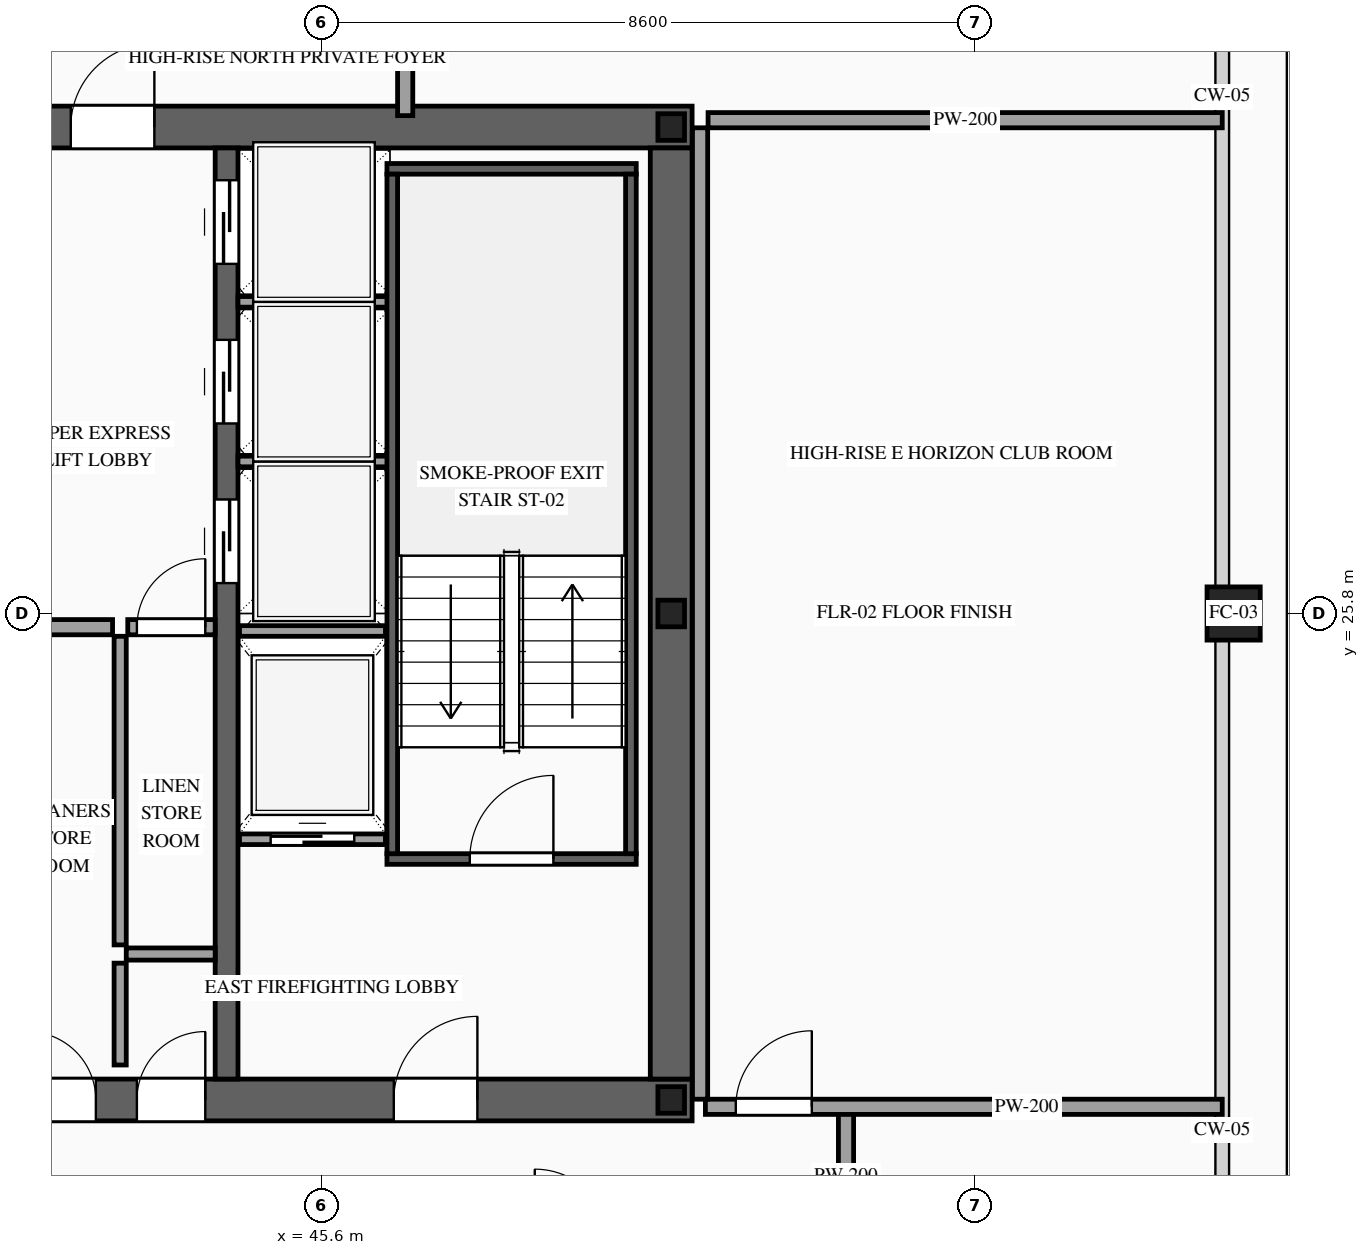
"""IFC4 building model, lengths in metres.
Left out: names, types, materials, properties, quantities, classifications, styles, units other than length and angle.
Written with IfcOpenShell. Run it as: python <this file> out.ifc"""

import sys

from ifc_helpers import new_model, si_unit, direction, frame, frame_2d, origin, origin_2d, place, context, subcontext, project, spatial, rectangle, hollow_rectangle, i_section, extrude, source, transform, mapped, element, fill, save


model = new_model("IFC4")
c1 = context("Model", 3, precision=1e-05, world=origin(), true_north=direction((0.0, 1.0)))
c2 = subcontext(c1, "Body", "Model", "MODEL_VIEW")
j1 = project(units=[si_unit("LENGTHUNIT", "METRE"), si_unit("PLANEANGLEUNIT", "RADIAN")], contexts=[c1])
p1 = place(None, origin())
s1 = spatial("IfcSite", under=j1, at=p1, CompositionType="ELEMENT")
p2 = place(p1, origin())
s2 = spatial("IfcBuilding", under=s1, at=p2, CompositionType="ELEMENT")
p3 = place(p2, frame((0.0, 0.0, 268.1)))
s3 = spatial("IfcBuildingStorey", under=s2, at=p3, CompositionType="ELEMENT", Elevation=268.1)
p4 = place(p3, frame((23.525, 19.4, 0.0), z_axis=(0.0, 0.0, 1.0), x_axis=(1.0, 0.0, 0.0)))
e1 = element("IfcWall", 1, at=p4, inside=s3, PredefinedType="SHEAR", context=c2, shape_type="SweptSolid", body=[
    extrude(rectangle(XDim=26.95, YDim=0.55, at=frame_2d((13.475, 0.0))), origin(), (0.0, 0.0, 1.0), 3.5),
])
p5 = place(p4, frame((1.925, 0.0, 0.0)))
e2 = element("IfcOpeningElement", 2, at=p5, cuts=e1, PredefinedType="OPENING", context=c2, shape_type="SweptSolid", body=[
    extrude(rectangle(XDim=1.1, YDim=2.2, at=frame_2d((0.55, 1.1))), frame((0.0, 0.29, 0.0), z_axis=(0.0, -1.0, 0.0), x_axis=(1.0, 0.0, 0.0)), (0.0, 0.0, 1.0), 0.58),
])
p6 = place(p4, frame((9.825, 0.0, 0.0)))
e3 = element("IfcOpeningElement", 3, at=p6, cuts=e1, PredefinedType="OPENING", context=c2, shape_type="SweptSolid", body=[
    extrude(rectangle(XDim=1.1, YDim=2.2, at=frame_2d((0.55, 1.1))), frame((0.0, 0.29, 0.0), z_axis=(0.0, -1.0, 0.0), x_axis=(1.0, 0.0, 0.0)), (0.0, 0.0, 1.0), 0.58),
])
p7 = place(p4, frame((23.025, 0.0, 0.0)))
e4 = element("IfcOpeningElement", 4, at=p7, cuts=e1, PredefinedType="OPENING", context=c2, shape_type="SweptSolid", body=[
    extrude(rectangle(XDim=1.1, YDim=2.2, at=frame_2d((0.55, 1.1))), frame((0.0, 0.29, 0.0), z_axis=(0.0, -1.0, 0.0), x_axis=(1.0, 0.0, 0.0)), (0.0, 0.0, 1.0), 0.58),
])
p8 = place(p4, frame((19.645, 0.0, 0.0)))
e5 = element("IfcOpeningElement", 5, at=p8, cuts=e1, PredefinedType="OPENING", context=c2, shape_type="SweptSolid", body=[
    extrude(rectangle(XDim=0.9, YDim=2.15, at=frame_2d((0.45, 1.075))), frame((0.0, 0.29, 0.0), z_axis=(0.0, -1.0, 0.0), x_axis=(1.0, 0.0, 0.0)), (0.0, 0.0, 1.0), 0.58),
])
p9 = place(p4, frame((18.205, 0.0, 0.0)))
e6 = element("IfcOpeningElement", 6, at=p9, cuts=e1, PredefinedType="OPENING", context=c2, shape_type="SweptSolid", body=[
    extrude(rectangle(XDim=0.9, YDim=2.15, at=frame_2d((0.45, 1.075))), frame((0.0, 0.29, 0.0), z_axis=(0.0, -1.0, 0.0), x_axis=(1.0, 0.0, 0.0)), (0.0, 0.0, 1.0), 0.58),
])
p10 = place(p3, frame((23.525, 32.2, 0.0), z_axis=(0.0, 0.0, 1.0), x_axis=(1.0, 0.0, 0.0)))
e7 = element("IfcWall", 7, at=p10, inside=s3, PredefinedType="SHEAR", context=c2, shape_type="SweptSolid", body=[
    extrude(rectangle(XDim=26.95, YDim=0.55, at=frame_2d((13.475, 0.0))), origin(), (0.0, 0.0, 1.0), 3.5),
])
p11 = place(p10, frame((4.545, 0.0, 0.0)))
e8 = element("IfcOpeningElement", 8, at=p11, cuts=e7, PredefinedType="OPENING", context=c2, shape_type="SweptSolid", body=[
    extrude(rectangle(XDim=0.9, YDim=2.15, at=frame_2d((0.45, 1.075))), frame((0.0, 0.29, 0.0), z_axis=(0.0, -1.0, 0.0), x_axis=(1.0, 0.0, 0.0)), (0.0, 0.0, 1.0), 0.58),
])
p12 = place(p10, frame((9.825, 0.0, 0.0)))
e9 = element("IfcOpeningElement", 9, at=p12, cuts=e7, PredefinedType="OPENING", context=c2, shape_type="SweptSolid", body=[
    extrude(rectangle(XDim=1.1, YDim=2.2, at=frame_2d((0.55, 1.1))), frame((0.0, 0.29, 0.0), z_axis=(0.0, -1.0, 0.0), x_axis=(1.0, 0.0, 0.0)), (0.0, 0.0, 1.0), 0.58),
])
p13 = place(p10, frame((15.675, 0.0, 0.0)))
e10 = element("IfcOpeningElement", 10, at=p13, cuts=e7, PredefinedType="OPENING", context=c2, shape_type="SweptSolid", body=[
    extrude(rectangle(XDim=1.1, YDim=2.2, at=frame_2d((0.55, 1.1))), frame((0.0, 0.29, 0.0), z_axis=(0.0, -1.0, 0.0), x_axis=(1.0, 0.0, 0.0)), (0.0, 0.0, 1.0), 0.58),
])
p14 = place(p10, frame((18.775, 0.0, 0.0)))
e11 = element("IfcOpeningElement", 11, at=p14, cuts=e7, PredefinedType="OPENING", context=c2, shape_type="SweptSolid", body=[
    extrude(rectangle(XDim=1.1, YDim=2.2, at=frame_2d((0.55, 1.1))), frame((0.0, 0.29, 0.0), z_axis=(0.0, -1.0, 0.0), x_axis=(1.0, 0.0, 0.0)), (0.0, 0.0, 1.0), 0.58),
])
m1 = source(origin(), c2, "Body", "SweptSolid", [
    extrude(rectangle(XDim=12.25, YDim=0.55, at=frame_2d((6.125, 0.0))), origin(), (0.0, 0.0, 1.0), 3.5),
])
p15 = place(p3, frame((50.2, 19.675, 0.0), z_axis=(0.0, 0.0, 1.0), x_axis=(0.0, 1.0, 0.0)))
e12 = element("IfcWall", 12, at=p15, inside=s3, PredefinedType="SHEAR", context=c2, shape_type="MappedRepresentation", body=[
    mapped(m1, transform((0.0, 0.0, 0.0), scale=1.0)),
])
p16 = place(p3, frame((44.35, 19.675, 0.0), z_axis=(0.0, 0.0, 1.0), x_axis=(0.0, 1.0, 0.0)))
e13 = element("IfcWall", 13, at=p16, inside=s3, PredefinedType="SOLIDWALL", context=c2, shape_type="SweptSolid", body=[
    extrude(rectangle(XDim=12.25, YDim=0.3, at=frame_2d((6.125, 0.0))), origin(), (0.0, 0.0, 1.0), 3.5),
])
p17 = place(p16, frame((6.525, 0.0, 0.0)))
e14 = element("IfcOpeningElement", 14, at=p17, cuts=e13, PredefinedType="OPENING", context=c2, shape_type="SweptSolid", body=[
    extrude(rectangle(XDim=1.1, YDim=2.2, at=frame_2d((0.55, 1.1))), frame((0.0, 0.165, 0.0), z_axis=(0.0, -1.0, 0.0), x_axis=(1.0, 0.0, 0.0)), (0.0, 0.0, 1.0), 0.33),
])
p18 = place(p16, frame((8.625, 0.0, 0.0)))
e15 = element("IfcOpeningElement", 15, at=p18, cuts=e13, PredefinedType="OPENING", context=c2, shape_type="SweptSolid", body=[
    extrude(rectangle(XDim=1.1, YDim=2.2, at=frame_2d((0.55, 1.1))), frame((0.0, 0.165, 0.0), z_axis=(0.0, -1.0, 0.0), x_axis=(1.0, 0.0, 0.0)), (0.0, 0.0, 1.0), 0.33),
])
p19 = place(p16, frame((10.725, 0.0, 0.0)))
e16 = element("IfcOpeningElement", 16, at=p19, cuts=e13, PredefinedType="OPENING", context=c2, shape_type="SweptSolid", body=[
    extrude(rectangle(XDim=1.1, YDim=2.2, at=frame_2d((0.55, 1.1))), frame((0.0, 0.165, 0.0), z_axis=(0.0, -1.0, 0.0), x_axis=(1.0, 0.0, 0.0)), (0.0, 0.0, 1.0), 0.33),
])
m2 = source(origin(), c2, "Body", "SweptSolid", [
    extrude(i_section(OverallWidth=0.35, OverallDepth=0.35, WebThickness=0.012, FlangeThickness=0.019, at=origin_2d()), origin(), (0.0, 0.0, 1.0), 3.5),
])
for number, where, z_axis, x_axis in (
    (17, (50.2, 19.4, 0.0), (0.0, 0.0, 1.0), (1.0, 0.0, 0.0)),
    (18, (50.2, 25.8, 0.0), (0.0, 0.0, 1.0), (1.0, 0.0, 0.0)),
    (19, (50.2, 32.2, 0.0), (0.0, 0.0, 1.0), (1.0, 0.0, 0.0)),
):
    element("IfcColumn", number, at=place(p3, frame(where, z_axis=z_axis, x_axis=x_axis)), inside=s3, PredefinedType="COLUMN", context=c2, shape_type="MappedRepresentation", body=[
        mapped(m2, transform((0.0, 0.0, 0.0), scale=1.0)),
    ])
m3 = source(origin(), c2, "Body", "SweptSolid", [
    extrude(hollow_rectangle(XDim=0.7, YDim=0.7, WallThickness=0.032, at=origin_2d()), origin(), (0.0, 0.0, 1.0), 3.5),
])
p20 = place(p3, frame((57.6, 25.8, 0.0), z_axis=(0.0, 0.0, 1.0), x_axis=(1.0, 0.0, 0.0)))
e20 = element("IfcColumn", 20, at=p20, inside=s3, PredefinedType="COLUMN", context=c2, shape_type="MappedRepresentation", body=[
    mapped(m3, transform((0.0, 0.0, 0.0), scale=1.0)),
])
p21 = place(p3, frame((44.52, 22.83, 0.0), z_axis=(0.0, 0.0, 1.0), x_axis=(1.0, 0.0, 0.0)))
e21 = element("IfcWall", 21, at=p21, inside=s3, PredefinedType="SOLIDWALL", context=c2, shape_type="SweptSolid", body=[
    extrude(rectangle(XDim=1.92, YDim=0.14, at=frame_2d((0.96, 0.0))), origin(), (0.0, 0.0, 1.0), 3.28),
])
p22 = place(p21, frame((0.41, 0.0, 0.0)))
e22 = element("IfcOpeningElement", 22, at=p22, cuts=e21, PredefinedType="OPENING", context=c2, shape_type="SweptSolid", body=[
    extrude(rectangle(XDim=1.1, YDim=2.2, at=frame_2d((0.55, 1.1))), frame((0.0, 0.085, 0.0), z_axis=(0.0, -1.0, 0.0), x_axis=(1.0, 0.0, 0.0)), (0.0, 0.0, 1.0), 0.17),
])
m4 = source(origin(), c2, "Body", "SweptSolid", [
    extrude(rectangle(XDim=1.92, YDim=0.14, at=frame_2d((0.96, 0.0))), origin(), (0.0, 0.0, 1.0), 3.28),
])
p23 = place(p3, frame((44.52, 25.57, 0.0), z_axis=(0.0, 0.0, 1.0), x_axis=(1.0, 0.0, 0.0)))
e23 = element("IfcWall", 23, at=p23, inside=s3, PredefinedType="SOLIDWALL", context=c2, shape_type="MappedRepresentation", body=[
    mapped(m4, transform((0.0, 0.0, 0.0), scale=1.0)),
])
m5 = source(origin(), c2, "Body", "SweptSolid", [
    extrude(rectangle(XDim=2.0, YDim=0.14, at=frame_2d((1.0, 0.0))), origin(), (0.0, 0.0, 1.0), 3.28),
])
for number, where, z_axis, x_axis in (
    (24, (44.5, 27.8, 0.0), (0.0, 0.0, 1.0), (1.0, 0.0, 0.0)),
    (25, (44.5, 29.9, 0.0), (0.0, 0.0, 1.0), (1.0, 0.0, 0.0)),
):
    element("IfcWall", number, at=place(p3, frame(where, z_axis=z_axis, x_axis=x_axis)), inside=s3, PredefinedType="SOLIDWALL", context=c2, shape_type="MappedRepresentation", body=[
        mapped(m5, transform((0.0, 0.0, 0.0), scale=1.0)),
    ])
p24 = place(p3, frame((46.46, 22.57, 0.0), z_axis=(0.0, 0.0, 1.0), x_axis=(1.0, 0.0, 0.0)))
e26 = element("IfcWall", 26, at=p24, inside=s3, PredefinedType="SOLIDWALL", context=c2, shape_type="SweptSolid", body=[
    extrude(rectangle(XDim=3.28, YDim=0.14, at=frame_2d((1.64, 0.0))), origin(), (0.0, 0.0, 1.0), 3.28),
])
p25 = place(p24, frame((1.09, 0.0, 0.0)))
e27 = element("IfcOpeningElement", 27, at=p25, cuts=e26, PredefinedType="OPENING", context=c2, shape_type="SweptSolid", body=[
    extrude(rectangle(XDim=1.1, YDim=2.2, at=frame_2d((0.55, 1.1))), frame((0.0, 0.085, 0.0), z_axis=(0.0, -1.0, 0.0), x_axis=(1.0, 0.0, 0.0)), (0.0, 0.0, 1.0), 0.17),
])
m6 = source(origin(), c2, "Body", "SweptSolid", [
    extrude(rectangle(XDim=3.28, YDim=0.14, at=frame_2d((1.64, 0.0))), origin(), (0.0, 0.0, 1.0), 3.28),
])
p26 = place(p3, frame((46.46, 31.65, 0.0), z_axis=(0.0, 0.0, 1.0), x_axis=(1.0, 0.0, 0.0)))
e28 = element("IfcWall", 28, at=p26, inside=s3, PredefinedType="SOLIDWALL", context=c2, shape_type="MappedRepresentation", body=[
    mapped(m6, transform((0.0, 0.0, 0.0), scale=1.0)),
])
m7 = source(origin(), c2, "Body", "SweptSolid", [
    extrude(rectangle(XDim=8.94, YDim=0.14, at=frame_2d((4.47, 0.0))), origin(), (0.0, 0.0, 1.0), 3.28),
])
for number, where, z_axis, x_axis in (
    (29, (46.53, 22.64, 0.0), (0.0, 0.0, 1.0), (0.0, 1.0, 0.0)),
    (30, (49.67, 22.64, 0.0), (0.0, 0.0, 1.0), (0.0, 1.0, 0.0)),
):
    element("IfcWall", number, at=place(p3, frame(where, z_axis=z_axis, x_axis=x_axis)), inside=s3, PredefinedType="SOLIDWALL", context=c2, shape_type="MappedRepresentation", body=[
        mapped(m7, transform((0.0, 0.0, 0.0), scale=1.0)),
    ])
m8 = source(origin(), c2, "Body", "SweptSolid", [
    extrude(rectangle(XDim=1.34, YDim=0.16, at=frame_2d((0.67, 0.0))), origin(), (0.0, 0.0, 1.0), 3.28),
])
p27 = place(p3, frame((42.95, 19.86, 0.0), z_axis=(0.0, 0.0, 1.0), x_axis=(0.0, 1.0, 0.0)))
e31 = element("IfcWall", 31, at=p27, inside=s3, PredefinedType="PARTITIONING", context=c2, shape_type="MappedRepresentation", body=[
    mapped(m8, transform((0.0, 0.0, 0.0), scale=1.0)),
])
m9 = source(origin(), c2, "Body", "SweptSolid", [
    extrude(rectangle(XDim=1.17, YDim=0.16, at=frame_2d((0.585, 0.0))), origin(), (0.0, 0.0, 1.0), 3.28),
])
p28 = place(p3, frame((43.03, 21.32, 0.0), z_axis=(0.0, 0.0, 1.0), x_axis=(1.0, 0.0, 0.0)))
e32 = element("IfcWall", 32, at=p28, inside=s3, PredefinedType="PARTITIONING", context=c2, shape_type="MappedRepresentation", body=[
    mapped(m9, transform((0.0, 0.0, 0.0), scale=1.0)),
])
m10 = source(origin(), c2, "Body", "SweptSolid", [
    extrude(rectangle(XDim=1.35, YDim=0.2, at=frame_2d((0.675, 0.0))), origin(), (0.0, 0.0, 1.0), 3.28),
])
p29 = place(p3, frame((41.5, 25.62, 0.0), z_axis=(0.0, 0.0, 1.0), x_axis=(1.0, 0.0, 0.0)))
e33 = element("IfcWall", 33, at=p29, inside=s3, PredefinedType="PARTITIONING", context=c2, shape_type="MappedRepresentation", body=[
    mapped(m10, transform((0.0, 0.0, 0.0), scale=1.0)),
])
m11 = source(origin(), c2, "Body", "SweptSolid", [
    extrude(rectangle(XDim=4.06, YDim=0.16, at=frame_2d((2.03, 0.0))), origin(), (0.0, 0.0, 1.0), 3.28),
])
p30 = place(p3, frame((42.95, 21.44, 0.0), z_axis=(0.0, 0.0, 1.0), x_axis=(0.0, 1.0, 0.0)))
e34 = element("IfcWall", 34, at=p30, inside=s3, PredefinedType="PARTITIONING", context=c2, shape_type="MappedRepresentation", body=[
    mapped(m11, transform((0.0, 0.0, 0.0), scale=1.0)),
])
p31 = place(p3, frame((43.05, 25.62, 0.0), z_axis=(0.0, 0.0, 1.0), x_axis=(1.0, 0.0, 0.0)))
e35 = element("IfcWall", 35, at=p31, inside=s3, PredefinedType="PARTITIONING", context=c2, shape_type="SweptSolid", body=[
    extrude(rectangle(XDim=1.15, YDim=0.2, at=frame_2d((0.575, 0.0))), origin(), (0.0, 0.0, 1.0), 3.28),
])
p32 = place(p31, frame((0.12, 0.0, 0.0)))
e36 = element("IfcOpeningElement", 36, at=p32, cuts=e35, PredefinedType="OPENING", context=c2, shape_type="SweptSolid", body=[
    extrude(rectangle(XDim=0.9, YDim=2.15, at=frame_2d((0.45, 1.075))), frame((0.0, 0.115, 0.0), z_axis=(0.0, -1.0, 0.0), x_axis=(1.0, 0.0, 0.0)), (0.0, 0.0, 1.0), 0.23),
])
m12 = source(origin(), c2, "Body", "SweptSolid", [
    extrude(rectangle(XDim=1.7, YDim=0.2, at=frame_2d((0.85, 0.0))), origin(), (0.0, 0.0, 1.0), 3.28),
])
for number, where, z_axis, x_axis in (
    (37, (46.7, 32.35, 0.0), (0.0, 0.0, 1.0), (0.0, 1.0, 0.0)),
    (38, (52.5, 17.55, 0.0), (0.0, 0.0, 1.0), (0.0, 1.0, 0.0)),
):
    element("IfcWall", number, at=place(p3, frame(where, z_axis=z_axis, x_axis=x_axis)), inside=s3, PredefinedType="PARTITIONING", context=c2, shape_type="MappedRepresentation", body=[
        mapped(m12, transform((0.0, 0.0, 0.0), scale=1.0)),
    ])
p33 = place(p3, frame((50.65, 19.31, 0.0), z_axis=(0.0, 0.0, 1.0), x_axis=(1.0, 0.0, 0.0)))
e39 = element("IfcWall", 39, at=p33, inside=s3, PredefinedType="PARTITIONING", context=c2, shape_type="SweptSolid", body=[
    extrude(rectangle(XDim=6.8, YDim=0.2, at=frame_2d((3.4, 0.0))), origin(), (0.0, 0.0, 1.0), 2.825),
])
p34 = place(p33, frame((0.4, 0.0, 0.0)))
e40 = element("IfcOpeningElement", 40, at=p34, cuts=e39, PredefinedType="OPENING", context=c2, shape_type="SweptSolid", body=[
    extrude(rectangle(XDim=1.0, YDim=2.2, at=frame_2d((0.5, 1.1))), frame((0.0, 0.115, 0.0), z_axis=(0.0, -1.0, 0.0), x_axis=(1.0, 0.0, 0.0)), (0.0, 0.0, 1.0), 0.23),
])
m13 = source(origin(), c2, "Body", "SweptSolid", [
    extrude(rectangle(XDim=6.765, YDim=0.2, at=frame_2d((3.382, 0.0))), origin(), (0.0, 0.0, 1.0), 2.825),
])
p35 = place(p3, frame((50.685, 32.29, 0.0), z_axis=(0.0, 0.0, 1.0), x_axis=(1.0, 0.0, 0.0)))
e41 = element("IfcWall", 41, at=p35, inside=s3, PredefinedType="PARTITIONING", context=c2, shape_type="MappedRepresentation", body=[
    mapped(m13, transform((0.0, 0.0, 0.0), scale=1.0)),
])
m14 = source(origin(), c2, "Body", "SweptSolid", [
    extrude(rectangle(XDim=12.78, YDim=0.2, at=frame_2d((6.39, 0.0))), origin(), (0.0, 0.0, 1.0), 3.28),
])
p36 = place(p3, frame((50.58, 19.41, 0.0), z_axis=(0.0, 0.0, 1.0), x_axis=(0.0, 1.0, 0.0)))
e42 = element("IfcWall", 42, at=p36, inside=s3, PredefinedType="PARTITIONING", context=c2, shape_type="MappedRepresentation", body=[
    mapped(m14, transform((0.0, 0.0, 0.0), scale=1.0)),
])
m15 = source(origin(), c2, "Body", "SweptSolid", [
    extrude(rectangle(XDim=1.1, YDim=2.2, at=frame_2d((0.55, 1.1))), frame((0.0, 0.025, 0.0), z_axis=(0.0, -1.0, 0.0), x_axis=(1.0, 0.0, 0.0)), (0.0, 0.0, 1.0), 0.05),
])
p37 = place(p22, origin())
e43 = element("IfcDoor", 43, at=p37, inside=s3, OperationType="SLIDING_TO_RIGHT", PredefinedType="DOOR", context=c2, shape_type="MappedRepresentation", body=[
    mapped(m15, transform((0.0, 0.0, 0.0), scale=1.0)),
])
fill(e22, e43)
p38 = place(p17, origin())
e44 = element("IfcDoor", 44, at=p38, inside=s3, OperationType="SLIDING_TO_LEFT", PredefinedType="DOOR", context=c2, shape_type="MappedRepresentation", body=[
    mapped(m15, transform((0.0, 0.0, 0.0), scale=1.0)),
])
fill(e14, e44)
p39 = place(p18, origin())
e45 = element("IfcDoor", 45, at=p39, inside=s3, OperationType="SLIDING_TO_RIGHT", PredefinedType="DOOR", context=c2, shape_type="MappedRepresentation", body=[
    mapped(m15, transform((0.0, 0.0, 0.0), scale=1.0)),
])
fill(e15, e45)
p40 = place(p19, origin())
e46 = element("IfcDoor", 46, at=p40, inside=s3, OperationType="SLIDING_TO_LEFT", PredefinedType="DOOR", context=c2, shape_type="MappedRepresentation", body=[
    mapped(m15, transform((0.0, 0.0, 0.0), scale=1.0)),
])
fill(e16, e46)
m16 = source(origin(), c2, "Body", "SweptSolid", [
    extrude(rectangle(XDim=1.1, YDim=2.2, at=frame_2d((0.55, 1.1))), frame((0.0, 0.025, 0.0), z_axis=(0.0, -1.0, 0.0), x_axis=(1.0, 0.0, 0.0)), (0.0, 0.0, 1.0), 0.05),
])
p41 = place(p25, origin())
e47 = element("IfcDoor", 47, at=p41, inside=s3, OperationType="SINGLE_SWING_RIGHT", PredefinedType="DOOR", context=c2, shape_type="MappedRepresentation", body=[
    mapped(m16, transform((0.0, 0.0, 0.0), scale=1.0)),
])
fill(e27, e47)
p42 = place(p7, origin())
e48 = element("IfcDoor", 48, at=p42, inside=s3, OperationType="SINGLE_SWING_RIGHT", PredefinedType="DOOR", context=c2, shape_type="MappedRepresentation", body=[
    mapped(m16, transform((0.0, 0.0, 0.0), scale=1.0)),
])
fill(e4, e48)
p43 = place(p14, origin())
e49 = element("IfcDoor", 49, at=p43, inside=s3, OperationType="SINGLE_SWING_RIGHT", PredefinedType="DOOR", context=c2, shape_type="MappedRepresentation", body=[
    mapped(m16, transform((0.0, 0.0, 0.0), scale=1.0)),
])
fill(e11, e49)
m17 = source(origin(), c2, "Body", "SweptSolid", [
    extrude(rectangle(XDim=0.9, YDim=2.15, at=frame_2d((0.45, 1.075))), frame((0.0, 0.025, 0.0), z_axis=(0.0, -1.0, 0.0), x_axis=(1.0, 0.0, 0.0)), (0.0, 0.0, 1.0), 0.05),
])
p44 = place(p8, origin())
e50 = element("IfcDoor", 50, at=p44, inside=s3, OperationType="SINGLE_SWING_RIGHT", PredefinedType="DOOR", context=c2, shape_type="MappedRepresentation", body=[
    mapped(m17, transform((0.0, 0.0, 0.0), scale=1.0)),
])
fill(e5, e50)
p45 = place(p9, origin())
e51 = element("IfcDoor", 51, at=p45, inside=s3, OperationType="SINGLE_SWING_LEFT", PredefinedType="DOOR", context=c2, shape_type="MappedRepresentation", body=[
    mapped(m17, transform((0.0, 0.0, 0.0), scale=1.0)),
])
fill(e6, e51)
p46 = place(p32, origin())
e52 = element("IfcDoor", 52, at=p46, inside=s3, OperationType="SINGLE_SWING_RIGHT", PredefinedType="DOOR", context=c2, shape_type="MappedRepresentation", body=[
    mapped(m17, transform((0.0, 0.0, 0.0), scale=1.0)),
])
fill(e36, e52)
m18 = source(origin(), c2, "Body", "SweptSolid", [
    extrude(rectangle(XDim=1.0, YDim=2.2, at=frame_2d((0.5, 1.1))), frame((0.0, 0.025, 0.0), z_axis=(0.0, -1.0, 0.0), x_axis=(1.0, 0.0, 0.0)), (0.0, 0.0, 1.0), 0.05),
])
p47 = place(p34, origin())
e53 = element("IfcDoor", 53, at=p47, inside=s3, OperationType="SINGLE_SWING_RIGHT", PredefinedType="DOOR", context=c2, shape_type="MappedRepresentation", body=[
    mapped(m18, transform((0.0, 0.0, 0.0), scale=1.0)),
])
fill(e40, e53)
save(model, sys.argv[1])
